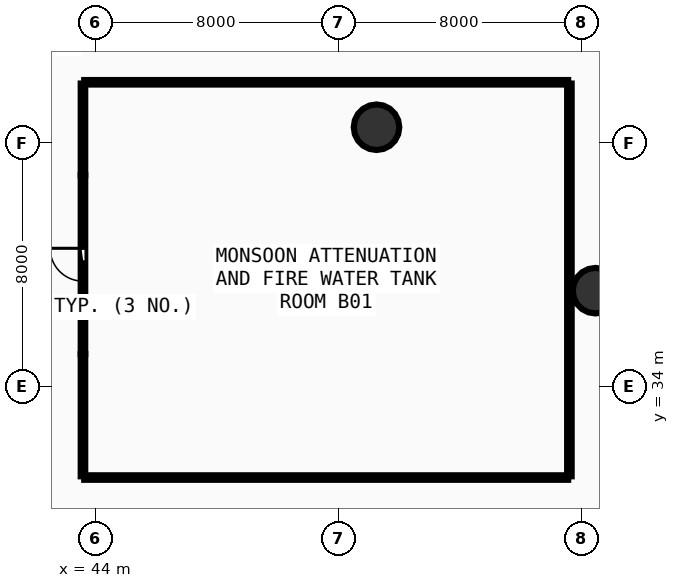
"""IFC4 building model, lengths in metres.
Left out: names, types, materials, properties, quantities, classifications, styles, units other than length and angle.
Written with IfcOpenShell. Run it as: python <this file> out.ifc"""

import sys

from ifc_helpers import new_model, si_unit, direction, frame, frame_2d, origin, origin_2d, place, context, subcontext, project, spatial, rectangle, circle, extrude, element, fill, save


model = new_model("IFC4")
c1 = context("Model", 3, precision=1e-05, world=origin(), true_north=direction((0.0, 1.0)))
c2 = subcontext(c1, "Body", "Model", "MODEL_VIEW")
j1 = project(units=[si_unit("LENGTHUNIT", "METRE"), si_unit("PLANEANGLEUNIT", "RADIAN")], contexts=[c1])
p1 = place(None, origin())
s1 = spatial("IfcSite", under=j1, at=p1, CompositionType="ELEMENT")
p2 = place(p1, origin())
s2 = spatial("IfcBuilding", under=s1, at=p2, CompositionType="ELEMENT")
p3 = place(p2, frame((0.0, 0.0, -4.2)))
s3 = spatial("IfcBuildingStorey", under=s2, at=p3, CompositionType="ELEMENT", Elevation=-4.2)
for number, where, z_axis, x_axis in (
    (1, (53.256, 42.522, 0.0), (0.0, 0.0, 1.0), (1.0, 0.0, 0.0)),
    (2, (60.46, 37.146, 0.0), (0.0, 0.0, 1.0), (1.0, 0.0, 0.0)),
):
    element("IfcColumn", number, at=place(p3, frame(where, z_axis=z_axis, x_axis=x_axis)), inside=s3, PredefinedType="COLUMN", context=c2, shape_type="SweptSolid", body=[
        extrude(circle(Radius=0.75, at=origin_2d()), origin(), (0.0, 0.0, 1.0), 4.2),
    ])
p4 = place(p3, frame((43.6, 35.06, 0.0), z_axis=(0.0, 0.0, 1.0), x_axis=(0.0, 1.0, 0.0)))
e3 = element("IfcWall", 3, at=p4, inside=s3, PredefinedType="PARTITIONING", context=c2, shape_type="SweptSolid", body=[
    extrude(rectangle(XDim=5.88, YDim=0.15, at=frame_2d((2.94, 0.0))), origin(), (0.0, 0.0, 1.0), 3.89),
])
p5 = place(p4, frame((2.4, 0.0, 0.0)))
e4 = element("IfcOpeningElement", 4, at=p5, cuts=e3, PredefinedType="OPENING", context=c2, shape_type="SweptSolid", body=[
    extrude(rectangle(XDim=1.08, YDim=2.1, at=frame_2d((0.54, 1.05))), frame((0.0, 0.085, 0.0), z_axis=(0.0, -1.0, 0.0), x_axis=(1.0, 0.0, 0.0)), (0.0, 0.0, 1.0), 0.17),
])
p6 = place(p3, frame((43.64, 31.0, 0.0), z_axis=(0.0, 0.0, 1.0), x_axis=(1.0, 0.0, 0.0)))
e5 = element("IfcWall", 5, at=p6, inside=s3, PredefinedType="PARTITIONING", context=c2, shape_type="SweptSolid", body=[
    extrude(rectangle(XDim=15.92, YDim=0.15, at=frame_2d((7.96, 0.0))), origin(), (0.0, 0.0, 1.0), 3.89),
])
p7 = place(p3, frame((59.6, 31.04, 0.0), z_axis=(0.0, 0.0, 1.0), x_axis=(0.0, 1.0, 0.0)))
e6 = element("IfcWall", 6, at=p7, inside=s3, PredefinedType="PARTITIONING", context=c2, shape_type="SweptSolid", body=[
    extrude(rectangle(XDim=12.92, YDim=0.15, at=frame_2d((6.46, 0.0))), origin(), (0.0, 0.0, 1.0), 3.285),
])
p8 = place(p3, frame((59.56, 44.0, 0.0), z_axis=(0.0, 0.0, 1.0), x_axis=(-1.0, 0.0, 0.0)))
e7 = element("IfcWall", 7, at=p8, inside=s3, PredefinedType="PARTITIONING", context=c2, shape_type="SweptSolid", body=[
    extrude(rectangle(XDim=15.92, YDim=0.15, at=frame_2d((7.96, 0.0))), origin(), (0.0, 0.0, 1.0), 3.285),
])
p9 = place(p3, frame((43.6, 43.96, 0.0), z_axis=(0.0, 0.0, 1.0), x_axis=(0.0, -1.0, 0.0)))
e8 = element("IfcWall", 8, at=p9, inside=s3, PredefinedType="PARTITIONING", context=c2, shape_type="SweptSolid", body=[
    extrude(rectangle(XDim=3.02, YDim=0.15, at=frame_2d((1.51, 0.0))), origin(), (0.0, 0.0, 1.0), 3.89),
])
p10 = place(p3, frame((43.6, 35.06, 0.0), z_axis=(0.0, 0.0, 1.0), x_axis=(0.0, -1.0, 0.0)))
e9 = element("IfcWall", 9, at=p10, inside=s3, PredefinedType="PARTITIONING", context=c2, shape_type="SweptSolid", body=[
    extrude(rectangle(XDim=4.02, YDim=0.15, at=frame_2d((2.01, 0.0))), origin(), (0.0, 0.0, 1.0), 3.89),
])
p11 = place(p5, origin())
e10 = element("IfcDoor", 10, at=p11, inside=s3, OperationType="SINGLE_SWING_RIGHT", PredefinedType="DOOR", context=c2, shape_type="SweptSolid", body=[
    extrude(rectangle(XDim=1.08, YDim=2.1, at=frame_2d((0.54, 1.05))), frame((0.0, 0.025, 0.0), z_axis=(0.0, -1.0, 0.0), x_axis=(1.0, 0.0, 0.0)), (0.0, 0.0, 1.0), 0.05),
])
fill(e4, e10)
save(model, sys.argv[1])
